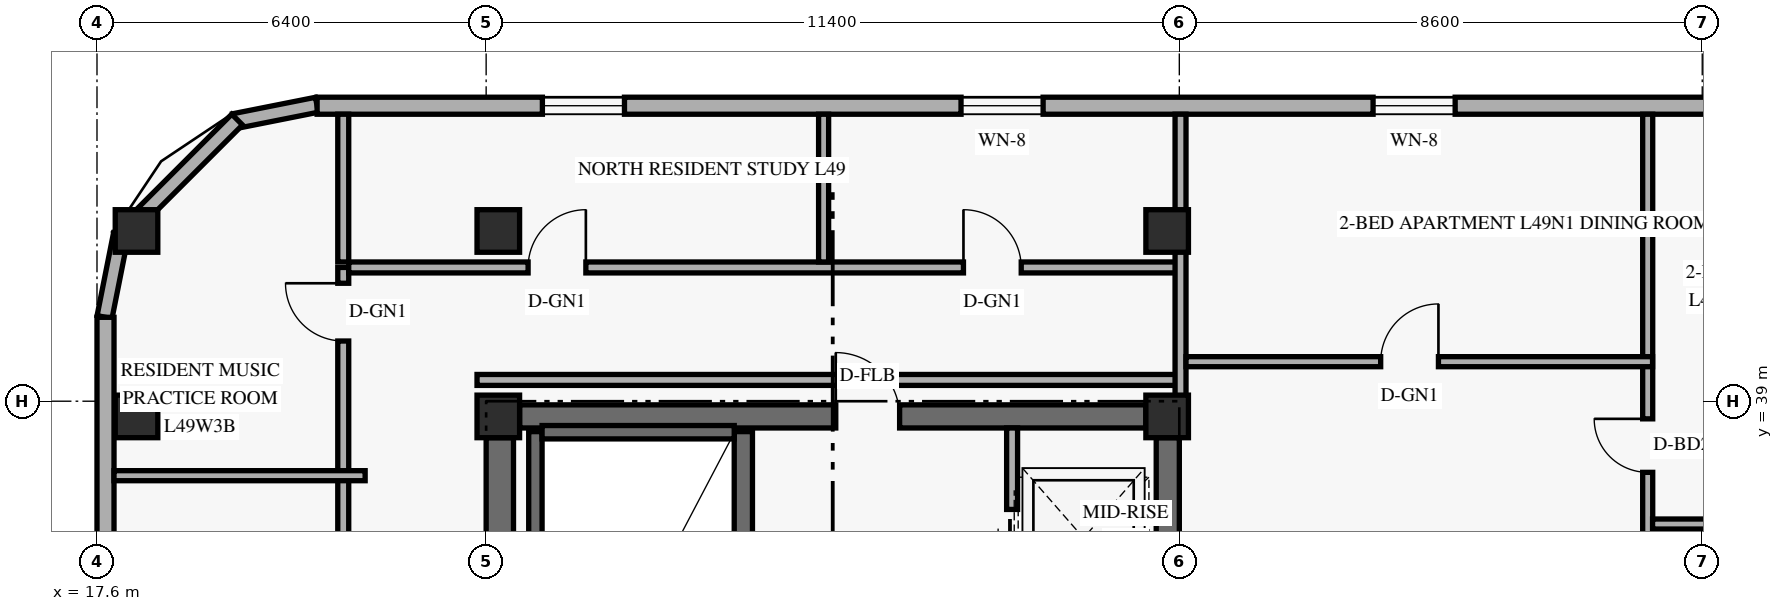
"""IFC4 building model, lengths in metres.
Left out: names, types, materials, properties, quantities, classifications, styles, units other than length and angle.
Written with IfcOpenShell. Run it as: python <this file> out.ifc"""

import sys

from ifc_helpers import new_model, si_unit, direction, frame, frame_2d, origin, origin_2d, place, context, subcontext, project, spatial, rectangle, extrude, element, fill, save


model = new_model("IFC4")
c1 = context("Model", 3, precision=1e-05, world=origin(), true_north=direction((0.0, 1.0)))
c2 = subcontext(c1, "Body", "Model", "MODEL_VIEW")
j1 = project(units=[si_unit("LENGTHUNIT", "METRE"), si_unit("PLANEANGLEUNIT", "RADIAN")], contexts=[c1])
p1 = place(None, origin())
s1 = spatial("IfcSite", under=j1, at=p1, CompositionType="ELEMENT")
p2 = place(p1, origin())
s2 = spatial("IfcBuilding", under=s1, at=p2, CompositionType="ELEMENT")
p3 = place(p2, frame((0.0, 0.0, 188.4)))
s3 = spatial("IfcBuildingStorey", under=s2, at=p3, CompositionType="ELEMENT", Elevation=188.4)
p4 = place(p3, frame((24.225, 30.55, 0.0), z_axis=(0.0, 0.0, 1.0), x_axis=(0.0, 1.0, 0.0)))
e1 = element("IfcWall", 1, at=p4, inside=s3, PredefinedType="SHEAR", context=c2, shape_type="SweptSolid", body=[
    extrude(rectangle(XDim=7.85, YDim=0.45, at=frame_2d((3.925, 0.0))), origin(), (0.0, 0.0, 1.0), 2.738),
])
p5 = place(p3, frame((35.21, 31.35, 0.0), z_axis=(0.0, 0.0, 1.0), x_axis=(0.0, 1.0, 0.0)))
e2 = element("IfcWall", 2, at=p5, inside=s3, PredefinedType="SHEAR", context=c2, shape_type="SweptSolid", body=[
    extrude(rectangle(XDim=7.05, YDim=0.38, at=frame_2d((3.525, 0.0))), origin(), (0.0, 0.0, 1.0), 2.738),
])
p6 = place(p3, frame((24.55, 38.75, 0.0), z_axis=(0.0, 0.0, 1.0), x_axis=(1.0, 0.0, 0.0)))
e3 = element("IfcWall", 3, at=p6, inside=s3, PredefinedType="SHEAR", context=c2, shape_type="SweptSolid", body=[
    extrude(rectangle(XDim=10.3, YDim=0.38, at=frame_2d((5.15, 0.0))), origin(), (0.0, 0.0, 1.0), 3.35),
])
p7 = place(p6, frame((5.2, 0.0, 0.0)))
e4 = element("IfcOpeningElement", 4, at=p7, cuts=e3, PredefinedType="OPENING", context=c2, shape_type="SweptSolid", body=[
    extrude(rectangle(XDim=1.05, YDim=2.15, at=frame_2d((0.525, 1.075))), frame((0.0, 0.2, 0.0), z_axis=(0.0, -1.0, 0.0), x_axis=(1.0, 0.0, 0.0)), (0.0, 0.0, 1.0), 0.4),
])
p8 = place(p3, frame((24.81, 30.74, 0.0), z_axis=(0.0, 0.0, 1.0), x_axis=(0.0, 1.0, 0.0)))
e5 = element("IfcWall", 5, at=p8, inside=s3, PredefinedType="SHEAR", context=c2, shape_type="SweptSolid", body=[
    extrude(rectangle(XDim=7.76, YDim=0.22, at=frame_2d((3.88, 0.0))), origin(), (0.0, 0.0, 1.0), 3.35),
])
p9 = place(p3, frame((28.23, 30.74, 0.0), z_axis=(0.0, 0.0, 1.0), x_axis=(0.0, 1.0, 0.0)))
e6 = element("IfcWall", 6, at=p9, inside=s3, PredefinedType="SHEAR", context=c2, shape_type="SweptSolid", body=[
    extrude(rectangle(XDim=7.76, YDim=0.3, at=frame_2d((3.88, 0.0))), origin(), (0.0, 0.0, 1.0), 3.35),
])
p10 = place(p3, frame((24.92, 38.49, 0.0), z_axis=(0.0, 0.0, 1.0), x_axis=(1.0, 0.0, 0.0)))
e7 = element("IfcWall", 7, at=p10, inside=s3, PredefinedType="SHEAR", context=c2, shape_type="SweptSolid", body=[
    extrude(rectangle(XDim=3.16, YDim=0.22, at=frame_2d((1.58, 0.0))), origin(), (0.0, 0.0, 1.0), 3.35),
])
for number, where, z_axis, x_axis in (
    (8, (18.25, 38.75, 0.0), (0.0, 0.0, 1.0), (1.0, 0.0, 0.0)),
    (9, (18.25, 41.8, 0.0), (0.0, 0.0, 1.0), (1.0, 0.0, 0.0)),
    (10, (24.2, 38.75, 0.0), (0.0, 0.0, 1.0), (1.0, 0.0, 0.0)),
    (11, (24.2, 41.8, 0.0), (0.0, 0.0, 1.0), (1.0, 0.0, 0.0)),
    (12, (35.2, 38.75, 0.0), (0.0, 0.0, 1.0), (1.0, 0.0, 0.0)),
    (13, (35.2, 41.8, 0.0), (0.0, 0.0, 1.0), (1.0, 0.0, 0.0)),
):
    element("IfcColumn", number, at=place(p3, frame(where, z_axis=z_axis, x_axis=x_axis)), inside=s3, PredefinedType="COLUMN", context=c2, shape_type="SweptSolid", body=[
        extrude(rectangle(XDim=0.7, YDim=0.7, at=origin_2d()), origin(), (0.0, 0.0, 1.0), 3.6),
    ])
p11 = place(p3, frame((21.217, 43.876, 0.0), z_axis=(0.0, 0.0, 1.0), x_axis=(-0.980809899341, -0.19496651342, 0.0)))
e14 = element("IfcWall", 14, at=p11, inside=s3, PredefinedType="SOLIDWALL", context=c2, shape_type="SweptSolid", body=[
    extrude(rectangle(XDim=1.389, YDim=0.25, at=frame_2d((0.694, 0.0))), origin(), (0.0, 0.0, 1.0), 3.35),
])
p12 = place(p3, frame((19.905, 43.632, 0.0), z_axis=(0.0, 0.0, 1.0), x_axis=(-0.707106781187, -0.707106781187, 0.0)))
e15 = element("IfcWall", 15, at=p12, inside=s3, PredefinedType="SOLIDWALL", context=c2, shape_type="SweptSolid", body=[
    extrude(rectangle(XDim=2.739, YDim=0.25, at=frame_2d((1.37, 0.0))), origin(), (0.0, 0.0, 1.0), 3.35),
])
p13 = place(p3, frame((17.995, 41.746, 0.0), z_axis=(0.0, 0.0, 1.0), x_axis=(-0.195135625965, -0.9807762678, 0.0)))
e16 = element("IfcWall", 16, at=p13, inside=s3, PredefinedType="SOLIDWALL", context=c2, shape_type="SweptSolid", body=[
    extrude(rectangle(XDim=1.389, YDim=0.25, at=frame_2d((0.694, 0.0))), origin(), (0.0, 0.0, 1.0), 3.35),
])
p14 = place(p3, frame((54.98, 43.86, 0.0), z_axis=(0.0, 0.0, 1.0), x_axis=(-1.0, 0.0, 0.0)))
e17 = element("IfcWall", 17, at=p14, inside=s3, PredefinedType="SOLIDWALL", context=c2, shape_type="SweptSolid", body=[
    extrude(rectangle(XDim=33.76, YDim=0.28, at=frame_2d((16.88, 0.0))), origin(), (0.0, 0.0, 1.0), 3.35),
])
p15 = place(p14, frame((28.705, 0.0, 0.85)))
e18 = element("IfcOpeningElement", 18, at=p15, cuts=e17, PredefinedType="OPENING", context=c2, shape_type="SweptSolid", body=[
    extrude(rectangle(XDim=1.35, YDim=1.55, at=frame_2d((0.675, 0.775))), frame((0.0, 0.15, 0.0), z_axis=(0.0, -1.0, 0.0), x_axis=(1.0, 0.0, 0.0)), (0.0, 0.0, 1.0), 0.3),
])
p16 = place(p14, frame((21.82, 0.0, 0.85)))
e19 = element("IfcOpeningElement", 19, at=p16, cuts=e17, PredefinedType="OPENING", context=c2, shape_type="SweptSolid", body=[
    extrude(rectangle(XDim=1.35, YDim=1.55, at=frame_2d((0.675, 0.775))), frame((0.0, 0.15, 0.0), z_axis=(0.0, -1.0, 0.0), x_axis=(1.0, 0.0, 0.0)), (0.0, 0.0, 1.0), 0.3),
])
p17 = place(p14, frame((15.043, 0.0, 0.85)))
e20 = element("IfcOpeningElement", 20, at=p17, cuts=e17, PredefinedType="OPENING", context=c2, shape_type="SweptSolid", body=[
    extrude(rectangle(XDim=1.35, YDim=1.55, at=frame_2d((0.675, 0.775))), frame((0.0, 0.15, 0.0), z_axis=(0.0, -1.0, 0.0), x_axis=(1.0, 0.0, 0.0)), (0.0, 0.0, 1.0), 0.3),
])
p18 = place(p14, frame((9.132, 0.0, 0.85)))
e21 = element("IfcOpeningElement", 21, at=p18, cuts=e17, PredefinedType="OPENING", context=c2, shape_type="SweptSolid", body=[
    extrude(rectangle(XDim=1.35, YDim=1.55, at=frame_2d((0.675, 0.775))), frame((0.0, 0.15, 0.0), z_axis=(0.0, -1.0, 0.0), x_axis=(1.0, 0.0, 0.0)), (0.0, 0.0, 1.0), 0.3),
])
p19 = place(p14, frame((6.237, 0.0, 0.85)))
e22 = element("IfcOpeningElement", 22, at=p19, cuts=e17, PredefinedType="OPENING", context=c2, shape_type="SweptSolid", body=[
    extrude(rectangle(XDim=1.2, YDim=1.5, at=frame_2d((0.6, 0.75))), frame((0.0, 0.15, 0.0), z_axis=(0.0, -1.0, 0.0), x_axis=(1.0, 0.0, 0.0)), (0.0, 0.0, 1.0), 0.3),
])
p20 = place(p14, frame((2.293, 0.0, 0.85)))
e23 = element("IfcOpeningElement", 23, at=p20, cuts=e17, PredefinedType="OPENING", context=c2, shape_type="SweptSolid", body=[
    extrude(rectangle(XDim=1.35, YDim=1.55, at=frame_2d((0.675, 0.775))), frame((0.0, 0.15, 0.0), z_axis=(0.0, -1.0, 0.0), x_axis=(1.0, 0.0, 0.0)), (0.0, 0.0, 1.0), 0.3),
])
p21 = place(p3, frame((17.74, 40.38, 0.0), z_axis=(0.0, 0.0, 1.0), x_axis=(0.0, -1.0, 0.0)))
e24 = element("IfcWall", 24, at=p21, inside=s3, PredefinedType="SOLIDWALL", context=c2, shape_type="SweptSolid", body=[
    extrude(rectangle(XDim=32.76, YDim=0.28, at=frame_2d((16.38, 0.0))), origin(), (0.0, 0.0, 1.0), 3.35),
])
p22 = place(p21, frame((25.887, 0.0, 0.85)))
e25 = element("IfcOpeningElement", 25, at=p22, cuts=e24, PredefinedType="OPENING", context=c2, shape_type="SweptSolid", body=[
    extrude(rectangle(XDim=1.65, YDim=1.6, at=frame_2d((0.825, 0.8))), frame((0.0, 0.15, 0.0), z_axis=(0.0, -1.0, 0.0), x_axis=(1.0, 0.0, 0.0)), (0.0, 0.0, 1.0), 0.3),
])
p23 = place(p21, frame((18.56, 0.0, 0.85)))
e26 = element("IfcOpeningElement", 26, at=p23, cuts=e24, PredefinedType="OPENING", context=c2, shape_type="SweptSolid", body=[
    extrude(rectangle(XDim=1.65, YDim=1.6, at=frame_2d((0.825, 0.8))), frame((0.0, 0.15, 0.0), z_axis=(0.0, -1.0, 0.0), x_axis=(1.0, 0.0, 0.0)), (0.0, 0.0, 1.0), 0.3),
])
p24 = place(p21, frame((12.675, 0.0, 0.85)))
e27 = element("IfcOpeningElement", 27, at=p24, cuts=e24, PredefinedType="OPENING", context=c2, shape_type="SweptSolid", body=[
    extrude(rectangle(XDim=1.65, YDim=1.6, at=frame_2d((0.825, 0.8))), frame((0.0, 0.15, 0.0), z_axis=(0.0, -1.0, 0.0), x_axis=(1.0, 0.0, 0.0)), (0.0, 0.0, 1.0), 0.3),
])
p25 = place(p21, frame((5.268, 0.0, 0.85)))
e28 = element("IfcOpeningElement", 28, at=p25, cuts=e24, PredefinedType="OPENING", context=c2, shape_type="SweptSolid", body=[
    extrude(rectangle(XDim=1.65, YDim=1.6, at=frame_2d((0.825, 0.8))), frame((0.0, 0.15, 0.0), z_axis=(0.0, -1.0, 0.0), x_axis=(1.0, 0.0, 0.0)), (0.0, 0.0, 1.0), 0.3),
])
p26 = place(p3, frame((32.65, 31.35, 0.0), z_axis=(0.0, 0.0, 1.0), x_axis=(0.0, 1.0, 0.0)))
e29 = element("IfcWall", 29, at=p26, inside=s3, PredefinedType="STANDARD", context=c2, shape_type="SweptSolid", body=[
    extrude(rectangle(XDim=7.21, YDim=0.18, at=frame_2d((3.605, 0.0))), origin(), (0.0, 0.0, 1.0), 3.35),
])
p27 = place(p26, frame((0.52, 0.0, 0.0)))
e30 = element("IfcOpeningElement", 30, at=p27, cuts=e29, PredefinedType="OPENING", context=c2, shape_type="SweptSolid", body=[
    extrude(rectangle(XDim=1.05, YDim=2.2, at=frame_2d((0.525, 1.1))), frame((0.0, 0.1, 0.0), z_axis=(0.0, -1.0, 0.0), x_axis=(1.0, 0.0, 0.0)), (0.0, 0.0, 1.0), 0.2),
])
p28 = place(p26, frame((2.67, 0.0, 0.0)))
e31 = element("IfcOpeningElement", 31, at=p28, cuts=e29, PredefinedType="OPENING", context=c2, shape_type="SweptSolid", body=[
    extrude(rectangle(XDim=1.05, YDim=2.2, at=frame_2d((0.525, 1.1))), frame((0.0, 0.1, 0.0), z_axis=(0.0, -1.0, 0.0), x_axis=(1.0, 0.0, 0.0)), (0.0, 0.0, 1.0), 0.2),
])
p29 = place(p26, frame((4.82, 0.0, 0.0)))
e32 = element("IfcOpeningElement", 32, at=p29, cuts=e29, PredefinedType="OPENING", context=c2, shape_type="SweptSolid", body=[
    extrude(rectangle(XDim=1.05, YDim=2.2, at=frame_2d((0.525, 1.1))), frame((0.0, 0.1, 0.0), z_axis=(0.0, -1.0, 0.0), x_axis=(1.0, 0.0, 0.0)), (0.0, 0.0, 1.0), 0.2),
])
p30 = place(p3, frame((21.65, 6.8, 0.0), z_axis=(0.0, 0.0, 1.0), x_axis=(0.0, 1.0, 0.0)))
e33 = element("IfcWall", 33, at=p30, inside=s3, PredefinedType="STANDARD", context=c2, shape_type="SweptSolid", body=[
    extrude(rectangle(XDim=34.4, YDim=0.18, at=frame_2d((17.2, 0.0))), origin(), (0.0, 0.0, 1.0), 2.72),
])
p31 = place(p30, frame((0.3, 0.0, 0.0)))
e34 = element("IfcOpeningElement", 34, at=p31, cuts=e33, PredefinedType="OPENING", context=c2, shape_type="SweptSolid", body=[
    extrude(rectangle(XDim=0.95, YDim=2.15, at=frame_2d((0.475, 1.075))), frame((0.0, 0.1, 0.0), z_axis=(0.0, -1.0, 0.0), x_axis=(1.0, 0.0, 0.0)), (0.0, 0.0, 1.0), 0.2),
])
p32 = place(p30, frame((6.417, 0.0, 0.0)))
e35 = element("IfcOpeningElement", 35, at=p32, cuts=e33, PredefinedType="OPENING", context=c2, shape_type="SweptSolid", body=[
    extrude(rectangle(XDim=0.95, YDim=2.15, at=frame_2d((0.475, 1.075))), frame((0.0, 0.1, 0.0), z_axis=(0.0, -1.0, 0.0), x_axis=(1.0, 0.0, 0.0)), (0.0, 0.0, 1.0), 0.2),
])
p33 = place(p30, frame((13.395, 0.0, 0.0)))
e36 = element("IfcOpeningElement", 36, at=p33, cuts=e33, PredefinedType="OPENING", context=c2, shape_type="SweptSolid", body=[
    extrude(rectangle(XDim=0.95, YDim=2.15, at=frame_2d((0.475, 1.075))), frame((0.0, 0.1, 0.0), z_axis=(0.0, -1.0, 0.0), x_axis=(1.0, 0.0, 0.0)), (0.0, 0.0, 1.0), 0.2),
])
p34 = place(p30, frame((20.105, 0.0, 0.0)))
e37 = element("IfcOpeningElement", 37, at=p34, cuts=e33, PredefinedType="OPENING", context=c2, shape_type="SweptSolid", body=[
    extrude(rectangle(XDim=0.95, YDim=2.15, at=frame_2d((0.475, 1.075))), frame((0.0, 0.1, 0.0), z_axis=(0.0, -1.0, 0.0), x_axis=(1.0, 0.0, 0.0)), (0.0, 0.0, 1.0), 0.2),
])
p35 = place(p30, frame((27.083, 0.0, 0.0)))
e38 = element("IfcOpeningElement", 38, at=p35, cuts=e33, PredefinedType="OPENING", context=c2, shape_type="SweptSolid", body=[
    extrude(rectangle(XDim=0.95, YDim=2.15, at=frame_2d((0.475, 1.075))), frame((0.0, 0.1, 0.0), z_axis=(0.0, -1.0, 0.0), x_axis=(1.0, 0.0, 0.0)), (0.0, 0.0, 1.0), 0.2),
])
p36 = place(p30, frame((33.19, 0.0, 0.0)))
e39 = element("IfcOpeningElement", 39, at=p36, cuts=e33, PredefinedType="OPENING", context=c2, shape_type="SweptSolid", body=[
    extrude(rectangle(XDim=0.95, YDim=2.15, at=frame_2d((0.475, 1.075))), frame((0.0, 0.1, 0.0), z_axis=(0.0, -1.0, 0.0), x_axis=(1.0, 0.0, 0.0)), (0.0, 0.0, 1.0), 0.2),
])
p37 = place(p3, frame((21.74, 41.2, 0.0), z_axis=(0.0, 0.0, 1.0), x_axis=(1.0, 0.0, 0.0)))
e40 = element("IfcWall", 40, at=p37, inside=s3, PredefinedType="STANDARD", context=c2, shape_type="SweptSolid", body=[
    extrude(rectangle(XDim=13.68, YDim=0.18, at=frame_2d((6.84, 0.0))), origin(), (0.0, 0.0, 1.0), 2.72),
])
p38 = place(p37, frame((2.95, 0.0, 0.0)))
e41 = element("IfcOpeningElement", 41, at=p38, cuts=e40, PredefinedType="OPENING", context=c2, shape_type="SweptSolid", body=[
    extrude(rectangle(XDim=0.95, YDim=2.15, at=frame_2d((0.475, 1.075))), frame((0.0, 0.1, 0.0), z_axis=(0.0, -1.0, 0.0), x_axis=(1.0, 0.0, 0.0)), (0.0, 0.0, 1.0), 0.2),
])
p39 = place(p37, frame((10.11, 0.0, 0.0)))
e42 = element("IfcOpeningElement", 42, at=p39, cuts=e40, PredefinedType="OPENING", context=c2, shape_type="SweptSolid", body=[
    extrude(rectangle(XDim=0.95, YDim=2.15, at=frame_2d((0.475, 1.075))), frame((0.0, 0.1, 0.0), z_axis=(0.0, -1.0, 0.0), x_axis=(1.0, 0.0, 0.0)), (0.0, 0.0, 1.0), 0.2),
])
p40 = place(p3, frame((23.85, 39.35, 0.0), z_axis=(0.0, 0.0, 1.0), x_axis=(1.0, 0.0, 0.0)))
e43 = element("IfcWall", 43, at=p40, inside=s3, PredefinedType="STANDARD", context=c2, shape_type="SweptSolid", body=[
    extrude(rectangle(XDim=11.57, YDim=0.18, at=frame_2d((5.785, 0.0))), origin(), (0.0, 0.0, 1.0), 2.72),
])
p41 = place(p3, frame((21.65, 41.29, 0.0), z_axis=(0.0, 0.0, 1.0), x_axis=(0.0, 1.0, 0.0)))
e44 = element("IfcWall", 44, at=p41, inside=s3, PredefinedType="PARTITIONING", context=c2, shape_type="SweptSolid", body=[
    extrude(rectangle(XDim=2.43, YDim=0.18, at=frame_2d((1.215, 0.0))), origin(), (0.0, 0.0, 1.0), 2.869),
])
p42 = place(p3, frame((35.42, 38.75, 0.0), z_axis=(0.0, 0.0, 1.0), x_axis=(0.0, 1.0, 0.0)))
e45 = element("IfcWall", 45, at=p42, inside=s3, PredefinedType="PARTITIONING", context=c2, shape_type="SweptSolid", body=[
    extrude(rectangle(XDim=4.97, YDim=0.18, at=frame_2d((2.485, 0.0))), origin(), (0.0, 0.0, 1.0), 2.72),
])
p43 = place(p3, frame((43.103, 29.55, 0.0), z_axis=(0.0, 0.0, 1.0), x_axis=(0.0, 1.0, 0.0)))
e46 = element("IfcWall", 46, at=p43, inside=s3, PredefinedType="PARTITIONING", context=c2, shape_type="SweptSolid", body=[
    extrude(rectangle(XDim=14.17, YDim=0.165, at=frame_2d((7.085, 0.0))), origin(), (0.0, 0.0, 1.0), 2.72),
])
p44 = place(p43, frame((4.593, 0.0, 0.0)))
e47 = element("IfcOpeningElement", 47, at=p44, cuts=e46, PredefinedType="OPENING", context=c2, shape_type="SweptSolid", body=[
    extrude(rectangle(XDim=0.88, YDim=2.14, at=frame_2d((0.44, 1.07))), frame((0.0, 0.093, 0.0), z_axis=(0.0, -1.0, 0.0), x_axis=(1.0, 0.0, 0.0)), (0.0, 0.0, 1.0), 0.185),
])
p45 = place(p43, frame((8.28, 0.0, 0.0)))
e48 = element("IfcOpeningElement", 48, at=p45, cuts=e46, PredefinedType="OPENING", context=c2, shape_type="SweptSolid", body=[
    extrude(rectangle(XDim=0.88, YDim=2.14, at=frame_2d((0.44, 1.07))), frame((0.0, 0.093, 0.0), z_axis=(0.0, -1.0, 0.0), x_axis=(1.0, 0.0, 0.0)), (0.0, 0.0, 1.0), 0.185),
])
p46 = place(p3, frame((35.51, 39.65, 0.0), z_axis=(0.0, 0.0, 1.0), x_axis=(1.0, 0.0, 0.0)))
e49 = element("IfcWall", 49, at=p46, inside=s3, PredefinedType="PARTITIONING", context=c2, shape_type="SweptSolid", body=[
    extrude(rectangle(XDim=7.673, YDim=0.165, at=frame_2d((3.836, 0.0))), origin(), (0.0, 0.0, 1.0), 3.35),
])
p47 = place(p46, frame((3.201, 0.0, 0.0)))
e50 = element("IfcOpeningElement", 50, at=p47, cuts=e49, PredefinedType="OPENING", context=c2, shape_type="SweptSolid", body=[
    extrude(rectangle(XDim=0.95, YDim=2.15, at=frame_2d((0.475, 1.075))), frame((0.0, 0.093, 0.0), z_axis=(0.0, -1.0, 0.0), x_axis=(1.0, 0.0, 0.0)), (0.0, 0.0, 1.0), 0.185),
])
p48 = place(p3, frame((43.183, 36.98, 0.0), z_axis=(0.0, 0.0, 1.0), x_axis=(1.0, 0.0, 0.0)))
e51 = element("IfcWall", 51, at=p48, inside=s3, PredefinedType="PARTITIONING", context=c2, shape_type="SweptSolid", body=[
    extrude(rectangle(XDim=3.97, YDim=0.165, at=frame_2d((1.985, 0.0))), origin(), (0.0, 0.0, 1.0), 2.72),
])
p49 = place(p3, frame((17.88, 37.775, 0.0), z_axis=(0.0, 0.0, 1.0), x_axis=(1.0, 0.0, 0.0)))
e52 = element("IfcWall", 52, at=p49, inside=s3, PredefinedType="PARTITIONING", context=c2, shape_type="SweptSolid", body=[
    extrude(rectangle(XDim=4.13, YDim=0.165, at=frame_2d((2.065, 0.0))), origin(), (0.0, 0.0, 1.0), 2.869),
])
p50 = place(p3, frame((29.55, 41.29, 0.0), z_axis=(0.0, 0.0, 1.0), x_axis=(0.0, 1.0, 0.0)))
e53 = element("IfcWall", 53, at=p50, inside=s3, PredefinedType="PARTITIONING", context=c2, shape_type="SweptSolid", body=[
    extrude(rectangle(XDim=2.43, YDim=0.165, at=frame_2d((1.215, 0.0))), origin(), (0.0, 0.0, 1.0), 2.869),
])
p51 = place(p15, origin())
e54 = element("IfcWindow", 54, at=p51, inside=s3, PartitioningType="SINGLE_PANEL", PredefinedType="WINDOW", context=c2, shape_type="SweptSolid", body=[
    extrude(rectangle(XDim=1.35, YDim=1.55, at=frame_2d((0.675, 0.775))), frame((0.0, 0.03, 0.0), z_axis=(0.0, -1.0, 0.0), x_axis=(1.0, 0.0, 0.0)), (0.0, 0.0, 1.0), 0.06),
])
fill(e18, e54)
p52 = place(p16, origin())
e55 = element("IfcWindow", 55, at=p52, inside=s3, PartitioningType="SINGLE_PANEL", PredefinedType="WINDOW", context=c2, shape_type="SweptSolid", body=[
    extrude(rectangle(XDim=1.35, YDim=1.55, at=frame_2d((0.675, 0.775))), frame((0.0, 0.03, 0.0), z_axis=(0.0, -1.0, 0.0), x_axis=(1.0, 0.0, 0.0)), (0.0, 0.0, 1.0), 0.06),
])
fill(e19, e55)
p53 = place(p17, origin())
e56 = element("IfcWindow", 56, at=p53, inside=s3, PartitioningType="SINGLE_PANEL", PredefinedType="WINDOW", context=c2, shape_type="SweptSolid", body=[
    extrude(rectangle(XDim=1.35, YDim=1.55, at=frame_2d((0.675, 0.775))), frame((0.0, 0.03, 0.0), z_axis=(0.0, -1.0, 0.0), x_axis=(1.0, 0.0, 0.0)), (0.0, 0.0, 1.0), 0.06),
])
fill(e20, e56)
p54 = place(p29, origin())
e57 = element("IfcDoor", 57, at=p54, inside=s3, OperationType="SLIDING_TO_LEFT", PredefinedType="DOOR", context=c2, shape_type="SweptSolid", body=[
    extrude(rectangle(XDim=1.05, YDim=2.2, at=frame_2d((0.525, 1.1))), frame((0.0, 0.025, 0.0), z_axis=(0.0, -1.0, 0.0), x_axis=(1.0, 0.0, 0.0)), (0.0, 0.0, 1.0), 0.05),
])
fill(e32, e57)
p55 = place(p7, frame((1.05, 0.0, 0.0), z_axis=(0.0, 0.0, 1.0), x_axis=(-1.0, 0.0, 0.0)))
e58 = element("IfcDoor", 58, at=p55, inside=s3, OperationType="SINGLE_SWING_RIGHT", PredefinedType="DOOR", context=c2, shape_type="SweptSolid", body=[
    extrude(rectangle(XDim=1.05, YDim=2.15, at=frame_2d((0.525, 1.075))), frame((0.0, 0.025, 0.0), z_axis=(0.0, -1.0, 0.0), x_axis=(1.0, 0.0, 0.0)), (0.0, 0.0, 1.0), 0.05),
])
fill(e4, e58)
p56 = place(p47, origin())
e59 = element("IfcDoor", 59, at=p56, inside=s3, OperationType="SINGLE_SWING_RIGHT", PredefinedType="DOOR", context=c2, shape_type="SweptSolid", body=[
    extrude(rectangle(XDim=0.95, YDim=2.15, at=frame_2d((0.475, 1.075))), frame((0.0, 0.025, 0.0), z_axis=(0.0, -1.0, 0.0), x_axis=(1.0, 0.0, 0.0)), (0.0, 0.0, 1.0), 0.05),
])
fill(e50, e59)
p57 = place(p45, origin())
e60 = element("IfcDoor", 60, at=p57, inside=s3, OperationType="SINGLE_SWING_RIGHT", PredefinedType="DOOR", context=c2, shape_type="SweptSolid", body=[
    extrude(rectangle(XDim=0.88, YDim=2.14, at=frame_2d((0.44, 1.07))), frame((0.0, 0.025, 0.0), z_axis=(0.0, -1.0, 0.0), x_axis=(1.0, 0.0, 0.0)), (0.0, 0.0, 1.0), 0.05),
])
fill(e48, e60)
p58 = place(p36, origin())
e61 = element("IfcDoor", 61, at=p58, inside=s3, OperationType="SINGLE_SWING_RIGHT", PredefinedType="DOOR", context=c2, shape_type="SweptSolid", body=[
    extrude(rectangle(XDim=0.95, YDim=2.15, at=frame_2d((0.475, 1.075))), frame((0.0, 0.025, 0.0), z_axis=(0.0, -1.0, 0.0), x_axis=(1.0, 0.0, 0.0)), (0.0, 0.0, 1.0), 0.05),
])
fill(e39, e61)
p59 = place(p38, origin())
e62 = element("IfcDoor", 62, at=p59, inside=s3, OperationType="SINGLE_SWING_RIGHT", PredefinedType="DOOR", context=c2, shape_type="SweptSolid", body=[
    extrude(rectangle(XDim=0.95, YDim=2.15, at=frame_2d((0.475, 1.075))), frame((0.0, 0.025, 0.0), z_axis=(0.0, -1.0, 0.0), x_axis=(1.0, 0.0, 0.0)), (0.0, 0.0, 1.0), 0.05),
])
fill(e41, e62)
p60 = place(p39, origin())
e63 = element("IfcDoor", 63, at=p60, inside=s3, OperationType="SINGLE_SWING_LEFT", PredefinedType="DOOR", context=c2, shape_type="SweptSolid", body=[
    extrude(rectangle(XDim=0.95, YDim=2.15, at=frame_2d((0.475, 1.075))), frame((0.0, 0.025, 0.0), z_axis=(0.0, -1.0, 0.0), x_axis=(1.0, 0.0, 0.0)), (0.0, 0.0, 1.0), 0.05),
])
fill(e42, e63)
save(model, sys.argv[1])
